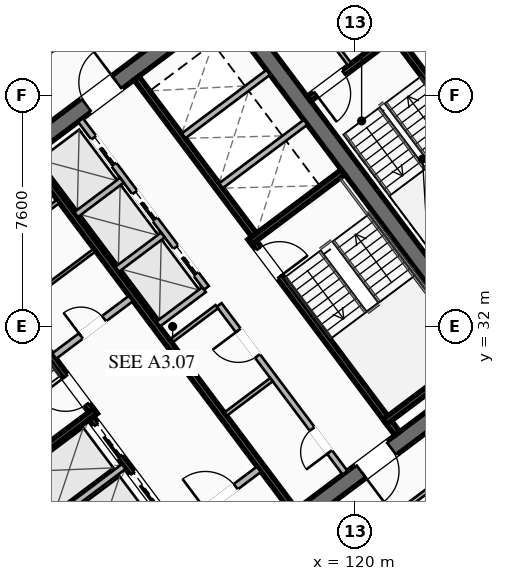
"""IFC4 building model, lengths in metres.
Left out: names, types, materials, properties, quantities, classifications, styles, units other than length and angle.
Written with IfcOpenShell. Run it as: python <this file> out.ifc"""

import sys

from ifc_helpers import new_model, si_unit, direction, frame, frame_2d, origin, place, context, subcontext, project, spatial, rectangle, extrude, element, fill, save


model = new_model("IFC4")
c1 = context("Model", 3, precision=1e-05, world=origin(), true_north=direction((0.0, 1.0)))
c2 = subcontext(c1, "Body", "Model", "MODEL_VIEW")
j1 = project(units=[si_unit("LENGTHUNIT", "METRE"), si_unit("PLANEANGLEUNIT", "RADIAN")], contexts=[c1])
p1 = place(None, origin())
s1 = spatial("IfcSite", under=j1, at=p1, CompositionType="ELEMENT")
p2 = place(p1, origin())
s2 = spatial("IfcBuilding", under=s1, at=p2, CompositionType="ELEMENT")
p3 = place(p2, frame((0.0, 0.0, 142.8)))
s3 = spatial("IfcBuildingStorey", under=s2, at=p3, CompositionType="ELEMENT", Elevation=142.8)
for number, where, z_axis, x_axis in (
    (1, (112.436, 21.077, 0.0), (0.0, 0.0, 1.0), (-0.6, 0.8, 0.0)),
    (2, (115.564, 42.923, 0.0), (0.0, 0.0, 1.0), (0.6, -0.8, 0.0)),
):
    element("IfcWall", number, at=place(p3, frame(where, z_axis=z_axis, x_axis=x_axis)), inside=s3, PredefinedType="SHEAR", context=c2, shape_type="SweptSolid", body=[
        extrude(rectangle(XDim=15.6, YDim=0.55, at=frame_2d((7.8, 0.0))), origin(), (0.0, 0.0, 1.0), 3.55),
    ])
p4 = place(p3, frame((124.539, 30.498, 0.0), z_axis=(0.0, 0.0, 1.0), x_axis=(-0.799998054672, -0.600002593761, 0.0)))
e3 = element("IfcWall", 3, at=p4, inside=s3, PredefinedType="SHEAR", context=c2, shape_type="SweptSolid", body=[
    extrude(rectangle(XDim=15.06, YDim=0.55, at=frame_2d((7.53, 0.0))), origin(), (0.0, 0.0, 1.0), 3.55),
])
p5 = place(p4, frame((9.23, 0.0, 0.0)))
e4 = element("IfcOpeningElement", 4, at=p5, cuts=e3, PredefinedType="OPENING", context=c2, shape_type="SweptSolid", body=[
    extrude(rectangle(XDim=1.25, YDim=2.25, at=frame_2d((0.625, 1.125))), frame((0.0, 0.285, 0.0), z_axis=(0.0, -1.0, 0.0), x_axis=(1.0, 0.0, 0.0)), (0.0, 0.0, 1.0), 0.57),
])
p6 = place(p4, frame((4.18, 0.0, 0.0)))
e5 = element("IfcOpeningElement", 5, at=p6, cuts=e3, PredefinedType="OPENING", context=c2, shape_type="SweptSolid", body=[
    extrude(rectangle(XDim=1.25, YDim=2.25, at=frame_2d((0.625, 1.125))), frame((0.0, 0.285, 0.0), z_axis=(0.0, -1.0, 0.0), x_axis=(1.0, 0.0, 0.0)), (0.0, 0.0, 1.0), 0.57),
])
p7 = place(p3, frame((103.461, 33.502, 0.0), z_axis=(0.0, 0.0, 1.0), x_axis=(0.799998054672, 0.600002593761, 0.0)))
e6 = element("IfcWall", 6, at=p7, inside=s3, PredefinedType="SHEAR", context=c2, shape_type="SweptSolid", body=[
    extrude(rectangle(XDim=15.06, YDim=0.55, at=frame_2d((7.53, 0.0))), origin(), (0.0, 0.0, 1.0), 3.55),
])
p8 = place(p7, frame((4.58, 0.0, 0.0)))
e7 = element("IfcOpeningElement", 7, at=p8, cuts=e6, PredefinedType="OPENING", context=c2, shape_type="SweptSolid", body=[
    extrude(rectangle(XDim=1.25, YDim=2.25, at=frame_2d((0.625, 1.125))), frame((0.0, 0.285, 0.0), z_axis=(0.0, -1.0, 0.0), x_axis=(1.0, 0.0, 0.0)), (0.0, 0.0, 1.0), 0.57),
])
p9 = place(p7, frame((9.63, 0.0, 0.0)))
e8 = element("IfcOpeningElement", 8, at=p9, cuts=e6, PredefinedType="OPENING", context=c2, shape_type="SweptSolid", body=[
    extrude(rectangle(XDim=1.25, YDim=2.25, at=frame_2d((0.625, 1.125))), frame((0.0, 0.285, 0.0), z_axis=(0.0, -1.0, 0.0), x_axis=(1.0, 0.0, 0.0)), (0.0, 0.0, 1.0), 0.57),
])
p10 = place(p3, frame((111.44, 29.08, 0.0), z_axis=(0.0, 0.0, 1.0), x_axis=(-0.59999029481, 0.8000072788, 0.0)))
e9 = element("IfcWall", 9, at=p10, inside=s3, PredefinedType="SHEAR", context=c2, shape_type="SweptSolid", body=[
    extrude(rectangle(XDim=8.05, YDim=0.2, at=frame_2d((4.025, 0.0))), origin(), (0.0, 0.0, 1.0), 3.37),
])
p11 = place(p10, frame((0.45, 0.0, 0.0)))
e10 = element("IfcOpeningElement", 10, at=p11, cuts=e9, PredefinedType="OPENING", context=c2, shape_type="SweptSolid", body=[
    extrude(rectangle(XDim=1.15, YDim=2.2, at=frame_2d((0.575, 1.1))), frame((0.0, 0.11, 0.0), z_axis=(0.0, -1.0, 0.0), x_axis=(1.0, 0.0, 0.0)), (0.0, 0.0, 1.0), 0.22),
])
p12 = place(p3, frame((108.396, 26.922, 0.0), z_axis=(0.0, 0.0, 1.0), x_axis=(0.800015298837, 0.599979601008, 0.0)))
e11 = element("IfcWall", 11, at=p12, inside=s3, PredefinedType="SHEAR", context=c2, shape_type="SweptSolid", body=[
    extrude(rectangle(XDim=3.83, YDim=0.2, at=frame_2d((1.915, 0.0))), origin(), (0.0, 0.0, 1.0), 3.37),
])
p13 = place(p3, frame((116.56, 34.92, 0.0), z_axis=(0.0, 0.0, 1.0), x_axis=(0.59999029481, -0.8000072788, 0.0)))
e12 = element("IfcWall", 12, at=p13, inside=s3, PredefinedType="SHEAR", context=c2, shape_type="SweptSolid", body=[
    extrude(rectangle(XDim=8.05, YDim=0.2, at=frame_2d((4.025, 0.0))), origin(), (0.0, 0.0, 1.0), 3.37),
])
p14 = place(p13, frame((0.45, 0.0, 0.0)))
e13 = element("IfcOpeningElement", 13, at=p14, cuts=e12, PredefinedType="OPENING", context=c2, shape_type="SweptSolid", body=[
    extrude(rectangle(XDim=1.15, YDim=2.2, at=frame_2d((0.575, 1.1))), frame((0.0, 0.11, 0.0), z_axis=(0.0, -1.0, 0.0), x_axis=(1.0, 0.0, 0.0)), (0.0, 0.0, 1.0), 0.22),
])
for number, where, z_axis, x_axis in (
    (14, (116.54, 34.78, 0.0), (0.0, 0.0, 1.0), (0.8, 0.6, 0.0)),
    (15, (120.98, 28.86, 0.0), (0.0, 0.0, 1.0), (0.8, 0.6, 0.0)),
):
    element("IfcWall", number, at=place(p3, frame(where, z_axis=z_axis, x_axis=x_axis)), inside=s3, PredefinedType="SHEAR", context=c2, shape_type="SweptSolid", body=[
        extrude(rectangle(XDim=3.83, YDim=0.2, at=frame_2d((1.915, 0.0))), origin(), (0.0, 0.0, 1.0), 3.37),
    ])
p15 = place(p3, frame((117.998, 25.936, 0.0), z_axis=(0.0, 0.0, 1.0), x_axis=(-0.600002693989, 0.799997979501, 0.0)))
e16 = element("IfcWall", 16, at=p15, inside=s3, PredefinedType="SHEAR", context=c2, shape_type="SweptSolid", body=[
    extrude(rectangle(XDim=14.5, YDim=0.2, at=frame_2d((7.25, 0.0))), origin(), (0.0, 0.0, 1.0), 3.37),
])
p16 = place(p3, frame((110.104, 31.028, 0.0), z_axis=(0.0, 0.0, 1.0), x_axis=(0.800018601094, 0.59997519774, 0.0)))
e17 = element("IfcWall", 17, at=p16, inside=s3, PredefinedType="SOLIDWALL", context=c2, shape_type="SweptSolid", body=[
    extrude(rectangle(XDim=3.15, YDim=0.22, at=frame_2d((1.575, 0.0))), origin(), (0.0, 0.0, 1.0), 2.723),
])
p17 = place(p16, frame((1.1, 0.0, 0.0)))
e18 = element("IfcOpeningElement", 18, at=p17, cuts=e17, PredefinedType="OPENING", context=c2, shape_type="SweptSolid", body=[
    extrude(rectangle(XDim=0.95, YDim=2.05, at=frame_2d((0.475, 1.025))), frame((0.0, 0.12, 0.0), z_axis=(0.0, -1.0, 0.0), x_axis=(1.0, 0.0, 0.0)), (0.0, 0.0, 1.0), 0.24),
])
p18 = place(p3, frame((114.316, 25.412, 0.0), z_axis=(0.0, 0.0, 1.0), x_axis=(0.800018601094, 0.59997519774, 0.0)))
e19 = element("IfcWall", 19, at=p18, inside=s3, PredefinedType="SOLIDWALL", context=c2, shape_type="SweptSolid", body=[
    extrude(rectangle(XDim=3.15, YDim=0.22, at=frame_2d((1.575, 0.0))), origin(), (0.0, 0.0, 1.0), 2.723),
])
p19 = place(p18, frame((0.95, 0.0, 0.0)))
e20 = element("IfcOpeningElement", 20, at=p19, cuts=e19, PredefinedType="OPENING", context=c2, shape_type="SweptSolid", body=[
    extrude(rectangle(XDim=1.25, YDim=2.25, at=frame_2d((0.625, 1.125))), frame((0.0, 0.12, 0.0), z_axis=(0.0, -1.0, 0.0), x_axis=(1.0, 0.0, 0.0)), (0.0, 0.0, 1.0), 0.24),
])
p20 = place(p3, frame((115.19, 23.83, 0.0), z_axis=(0.0, 0.0, 1.0), x_axis=(-0.599993943644, 0.800004542231, 0.0)))
e21 = element("IfcWall", 21, at=p20, inside=s3, PredefinedType="SHEAR", context=c2, shape_type="SweptSolid", body=[
    extrude(rectangle(XDim=6.45, YDim=0.2, at=frame_2d((3.225, 0.0))), origin(), (0.0, 0.0, 1.0), 3.37),
])
p21 = place(p20, frame((4.875, 0.0, 0.0)))
e22 = element("IfcOpeningElement", 22, at=p21, cuts=e21, PredefinedType="OPENING", context=c2, shape_type="SweptSolid", body=[
    extrude(rectangle(XDim=1.3, YDim=2.25, at=frame_2d((0.65, 1.125))), frame((0.0, 0.11, 0.0), z_axis=(0.0, -1.0, 0.0), x_axis=(1.0, 0.0, 0.0)), (0.0, 0.0, 1.0), 0.22),
])
p22 = place(p20, frame((2.875, 0.0, 0.0)))
e23 = element("IfcOpeningElement", 23, at=p22, cuts=e21, PredefinedType="OPENING", context=c2, shape_type="SweptSolid", body=[
    extrude(rectangle(XDim=1.3, YDim=2.25, at=frame_2d((0.65, 1.125))), frame((0.0, 0.11, 0.0), z_axis=(0.0, -1.0, 0.0), x_axis=(1.0, 0.0, 0.0)), (0.0, 0.0, 1.0), 0.22),
])
p23 = place(p20, frame((0.675, 0.0, 0.0)))
e24 = element("IfcOpeningElement", 24, at=p23, cuts=e21, PredefinedType="OPENING", context=c2, shape_type="SweptSolid", body=[
    extrude(rectangle(XDim=1.3, YDim=2.25, at=frame_2d((0.65, 1.125))), frame((0.0, 0.11, 0.0), z_axis=(0.0, -1.0, 0.0), x_axis=(1.0, 0.0, 0.0)), (0.0, 0.0, 1.0), 0.22),
])
p24 = place(p3, frame((109.608, 25.306, 0.0), z_axis=(0.0, 0.0, 1.0), x_axis=(0.8, 0.6, 0.0)))
e25 = element("IfcWall", 25, at=p24, inside=s3, PredefinedType="SOLIDWALL", context=c2, shape_type="SweptSolid", body=[
    extrude(rectangle(XDim=3.48, YDim=0.2, at=frame_2d((1.74, 0.0))), origin(), (0.0, 0.0, 1.0), 3.37),
])
p25 = place(p3, frame((112.81, 40.17, 0.0), z_axis=(0.0, 0.0, 1.0), x_axis=(0.599993943644, -0.800004542231, 0.0)))
e26 = element("IfcWall", 26, at=p25, inside=s3, PredefinedType="SHEAR", context=c2, shape_type="SweptSolid", body=[
    extrude(rectangle(XDim=6.45, YDim=0.2, at=frame_2d((3.225, 0.0))), origin(), (0.0, 0.0, 1.0), 3.37),
])
for number, where, z_axis, x_axis in (
    (27, (115.59, 36.63, 0.0), (0.0, 0.0, 1.0), (0.8, 0.6, 0.0)),
    (28, (114.36, 38.27, 0.0), (0.0, 0.0, 1.0), (0.8, 0.6, 0.0)),
):
    element("IfcWall", number, at=place(p3, frame(where, z_axis=z_axis, x_axis=x_axis)), inside=s3, PredefinedType="SOLIDWALL", context=c2, shape_type="SweptSolid", body=[
        extrude(rectangle(XDim=3.48, YDim=0.2, at=frame_2d((1.74, 0.0))), origin(), (0.0, 0.0, 1.0), 3.37),
    ])
p26 = place(p3, frame((107.71, 34.22, 0.0), z_axis=(0.0, 0.0, 1.0), x_axis=(0.799981399002, 0.60002480053, 0.0)))
e29 = element("IfcWall", 29, at=p26, inside=s3, PredefinedType="PARTITIONING", context=c2, shape_type="SweptSolid", body=[
    extrude(rectangle(XDim=3.15, YDim=0.135, at=frame_2d((1.575, 0.0))), origin(), (0.0, 0.0, 1.0), 2.723),
])
p27 = place(p26, frame((1.05, 0.0, 0.0)))
e30 = element("IfcOpeningElement", 30, at=p27, cuts=e29, PredefinedType="OPENING", context=c2, shape_type="SweptSolid", body=[
    extrude(rectangle(XDim=1.05, YDim=2.2, at=frame_2d((0.525, 1.1))), frame((0.0, 0.077, 0.0), z_axis=(0.0, -1.0, 0.0), x_axis=(1.0, 0.0, 0.0)), (0.0, 0.0, 1.0), 0.155),
])
p28 = place(p3, frame((108.91, 32.62, 0.0), z_axis=(0.0, 0.0, 1.0), x_axis=(0.800018601094, 0.59997519774, 0.0)))
e31 = element("IfcWall", 31, at=p28, inside=s3, PredefinedType="PARTITIONING", context=c2, shape_type="SweptSolid", body=[
    extrude(rectangle(XDim=3.15, YDim=0.11, at=frame_2d((1.575, 0.0))), origin(), (0.0, 0.0, 1.0), 2.723),
])
p29 = place(p3, frame((119.67, 27.19, 0.0), z_axis=(0.0, 0.0, 1.0), x_axis=(-0.599988677396, 0.800008491828, 0.0)))
e32 = element("IfcWall", 32, at=p29, inside=s3, PredefinedType="SOLIDWALL", context=c2, shape_type="SweptSolid", body=[
    extrude(rectangle(XDim=6.9, YDim=0.2, at=frame_2d((3.45, 0.0))), origin(), (0.0, 0.0, 1.0), 2.723),
])
p30 = place(p29, frame((0.85, 0.0, 0.0)))
e33 = element("IfcOpeningElement", 33, at=p30, cuts=e32, PredefinedType="OPENING", context=c2, shape_type="SweptSolid", body=[
    extrude(rectangle(XDim=0.95, YDim=2.05, at=frame_2d((0.475, 1.025))), frame((0.0, 0.11, 0.0), z_axis=(0.0, -1.0, 0.0), x_axis=(1.0, 0.0, 0.0)), (0.0, 0.0, 1.0), 0.22),
])
p31 = place(p29, frame((4.8, 0.0, 0.0)))
e34 = element("IfcOpeningElement", 34, at=p31, cuts=e32, PredefinedType="OPENING", context=c2, shape_type="SweptSolid", body=[
    extrude(rectangle(XDim=1.05, YDim=2.2, at=frame_2d((0.525, 1.1))), frame((0.0, 0.11, 0.0), z_axis=(0.0, -1.0, 0.0), x_axis=(1.0, 0.0, 0.0)), (0.0, 0.0, 1.0), 0.22),
])
for number, where, z_axis, x_axis in (
    (35, (113.946, 31.522, 0.0), (0.0, 0.0, 1.0), (0.8, 0.6, 0.0)),
    (36, (115.746, 29.122, 0.0), (0.0, 0.0, 1.0), (0.8, 0.6, 0.0)),
):
    element("IfcWall", number, at=place(p3, frame(where, z_axis=z_axis, x_axis=x_axis)), inside=s3, PredefinedType="PARTITIONING", context=c2, shape_type="SweptSolid", body=[
        extrude(rectangle(XDim=1.88, YDim=0.135, at=frame_2d((0.94, 0.0))), origin(), (0.0, 0.0, 1.0), 2.723),
    ])
p32 = place(p3, frame((115.11, 33.27, 0.0), z_axis=(0.0, 0.0, 1.0), x_axis=(-0.600011322243, 0.799991508192, 0.0)))
e37 = element("IfcWall", 37, at=p32, inside=s3, PredefinedType="SOLIDWALL", context=c2, shape_type="SweptSolid", body=[
    extrude(rectangle(XDim=6.9, YDim=0.2, at=frame_2d((3.45, 0.0))), origin(), (0.0, 0.0, 1.0), 3.37),
])
p33 = place(p32, frame((0.575, 0.0, 0.0)))
e38 = element("IfcOpeningElement", 38, at=p33, cuts=e37, PredefinedType="OPENING", context=c2, shape_type="SweptSolid", body=[
    extrude(rectangle(XDim=1.1, YDim=2.2, at=frame_2d((0.55, 1.1))), frame((0.0, 0.11, 0.0), z_axis=(0.0, -1.0, 0.0), x_axis=(1.0, 0.0, 0.0)), (0.0, 0.0, 1.0), 0.22),
])
p34 = place(p32, frame((2.825, 0.0, 0.0)))
e39 = element("IfcOpeningElement", 39, at=p34, cuts=e37, PredefinedType="OPENING", context=c2, shape_type="SweptSolid", body=[
    extrude(rectangle(XDim=1.1, YDim=2.2, at=frame_2d((0.55, 1.1))), frame((0.0, 0.11, 0.0), z_axis=(0.0, -1.0, 0.0), x_axis=(1.0, 0.0, 0.0)), (0.0, 0.0, 1.0), 0.22),
])
p35 = place(p32, frame((5.075, 0.0, 0.0)))
e40 = element("IfcOpeningElement", 40, at=p35, cuts=e37, PredefinedType="OPENING", context=c2, shape_type="SweptSolid", body=[
    extrude(rectangle(XDim=1.1, YDim=2.2, at=frame_2d((0.55, 1.1))), frame((0.0, 0.11, 0.0), z_axis=(0.0, -1.0, 0.0), x_axis=(1.0, 0.0, 0.0)), (0.0, 0.0, 1.0), 0.22),
])
p36 = place(p3, frame((113.526, 32.082, 0.0), z_axis=(0.0, 0.0, 1.0), x_axis=(0.800046745961, 0.599937666993, 0.0)))
e41 = element("IfcWall", 41, at=p36, inside=s3, PredefinedType="SOLIDWALL", context=c2, shape_type="SweptSolid", body=[
    extrude(rectangle(XDim=1.88, YDim=0.2, at=frame_2d((0.94, 0.0))), origin(), (0.0, 0.0, 1.0), 3.37),
])
p37 = place(p3, frame((112.176, 33.882, 0.0), z_axis=(0.0, 0.0, 1.0), x_axis=(0.8, 0.6, 0.0)))
e42 = element("IfcWall", 42, at=p37, inside=s3, PredefinedType="SOLIDWALL", context=c2, shape_type="SweptSolid", body=[
    extrude(rectangle(XDim=1.88, YDim=0.2, at=frame_2d((0.94, 0.0))), origin(), (0.0, 0.0, 1.0), 3.37),
])
p38 = place(p3, frame((110.826, 35.682, 0.0), z_axis=(0.0, 0.0, 1.0), x_axis=(0.799984418148, 0.600020775241, 0.0)))
e43 = element("IfcWall", 43, at=p38, inside=s3, PredefinedType="SOLIDWALL", context=c2, shape_type="SweptSolid", body=[
    extrude(rectangle(XDim=1.88, YDim=0.2, at=frame_2d((0.94, 0.0))), origin(), (0.0, 0.0, 1.0), 3.37),
])
p39 = place(p3, frame((125.304, 36.228, 0.0), z_axis=(0.0, 0.0, 1.0), x_axis=(-0.59998851072, 0.800008616831, 0.0)))
e44 = element("IfcWall", 44, at=p39, inside=s3, PredefinedType="SHEAR", context=c2, shape_type="SweptSolid", body=[
    extrude(rectangle(XDim=6.8, YDim=0.2, at=frame_2d((3.4, 0.0))), origin(), (0.0, 0.0, 1.0), 3.37),
])
p40 = place(p3, frame((121.204, 41.528, 0.0), z_axis=(0.0, 0.0, 1.0), x_axis=(-0.800017232136, -0.599977023131, 0.0)))
e45 = element("IfcWall", 45, at=p40, inside=s3, PredefinedType="SHEAR", context=c2, shape_type="SweptSolid", body=[
    extrude(rectangle(XDim=3.4, YDim=0.2, at=frame_2d((1.7, 0.0))), origin(), (0.0, 0.0, 1.0), 3.37),
])
p41 = place(p40, frame((1.975, 0.0, 0.0)))
e46 = element("IfcOpeningElement", 46, at=p41, cuts=e45, PredefinedType="OPENING", context=c2, shape_type="SweptSolid", body=[
    extrude(rectangle(XDim=1.15, YDim=2.2, at=frame_2d((0.575, 1.1))), frame((0.0, 0.11, 0.0), z_axis=(0.0, -1.0, 0.0), x_axis=(1.0, 0.0, 0.0)), (0.0, 0.0, 1.0), 0.22),
])
p42 = place(p3, frame((119.824, 40.618, 0.0), z_axis=(0.0, 0.0, 1.0), x_axis=(-0.599982243973, 0.800013316712, 0.0)))
e47 = element("IfcWall", 47, at=p42, inside=s3, PredefinedType="PARTITIONING", context=c2, shape_type="SweptSolid", body=[
    extrude(rectangle(XDim=4.4, YDim=0.135, at=frame_2d((2.2, 0.0))), origin(), (0.0, 0.0, 1.0), 2.723),
])
p43 = place(p3, frame((95.678, 30.346, 0.0), z_axis=(0.0, 0.0, 1.0), x_axis=(0.8, 0.6, 0.0)))
e48 = element("IfcWall", 48, at=p43, inside=s3, PredefinedType="PARTITIONING", context=c2, shape_type="SweptSolid", body=[
    extrude(rectangle(XDim=31.3, YDim=0.135, at=frame_2d((15.65, 0.0))), origin(), (0.0, 0.0, 1.0), 2.723),
])
p44 = place(p43, frame((0.3, 0.0, 0.0)))
e49 = element("IfcOpeningElement", 49, at=p44, cuts=e48, PredefinedType="OPENING", context=c2, shape_type="SweptSolid", body=[
    extrude(rectangle(XDim=0.95, YDim=2.05, at=frame_2d((0.475, 1.025))), frame((0.0, 0.077, 0.0), z_axis=(0.0, -1.0, 0.0), x_axis=(1.0, 0.0, 0.0)), (0.0, 0.0, 1.0), 0.155),
])
p45 = place(p43, frame((30.05, 0.0, 0.0)))
e50 = element("IfcOpeningElement", 50, at=p45, cuts=e48, PredefinedType="OPENING", context=c2, shape_type="SweptSolid", body=[
    extrude(rectangle(XDim=0.95, YDim=2.05, at=frame_2d((0.475, 1.025))), frame((0.0, 0.077, 0.0), z_axis=(0.0, -1.0, 0.0), x_axis=(1.0, 0.0, 0.0)), (0.0, 0.0, 1.0), 0.155),
])
p46 = place(p3, frame((132.13, 33.91, 0.0), z_axis=(0.0, 0.0, 1.0), x_axis=(-0.799997191971, -0.600003744021, 0.0)))
e51 = element("IfcWall", 51, at=p46, inside=s3, PredefinedType="PARTITIONING", context=c2, shape_type="SweptSolid", body=[
    extrude(rectangle(XDim=31.3, YDim=0.135, at=frame_2d((15.65, 0.0))), origin(), (0.0, 0.0, 1.0), 2.723),
])
p47 = place(p46, frame((29.97, 0.0, 0.0)))
e52 = element("IfcOpeningElement", 52, at=p47, cuts=e51, PredefinedType="OPENING", context=c2, shape_type="SweptSolid", body=[
    extrude(rectangle(XDim=0.95, YDim=2.05, at=frame_2d((0.475, 1.025))), frame((0.0, 0.077, 0.0), z_axis=(0.0, -1.0, 0.0), x_axis=(1.0, 0.0, 0.0)), (0.0, 0.0, 1.0), 0.155),
])
p48 = place(p46, frame((0.38, 0.0, 0.0)))
e53 = element("IfcOpeningElement", 53, at=p48, cuts=e51, PredefinedType="OPENING", context=c2, shape_type="SweptSolid", body=[
    extrude(rectangle(XDim=0.95, YDim=2.05, at=frame_2d((0.475, 1.025))), frame((0.0, 0.077, 0.0), z_axis=(0.0, -1.0, 0.0), x_axis=(1.0, 0.0, 0.0)), (0.0, 0.0, 1.0), 0.155),
])
p49 = place(p3, frame((112.104, 20.928, 0.0), z_axis=(0.0, 0.0, 1.0), x_axis=(-0.599994940075, 0.800003794918, 0.0)))
e54 = element("IfcWall", 54, at=p49, inside=s3, PredefinedType="PARTITIONING", context=c2, shape_type="SweptSolid", body=[
    extrude(rectangle(XDim=15.44, YDim=0.135, at=frame_2d((7.72, 0.0))), origin(), (0.0, 0.0, 1.0), 2.723),
])
p50 = place(p9, origin())
e55 = element("IfcDoor", 55, at=p50, inside=s3, OperationType="SINGLE_SWING_RIGHT", PredefinedType="DOOR", context=c2, shape_type="SweptSolid", body=[
    extrude(rectangle(XDim=1.25, YDim=2.25, at=frame_2d((0.625, 1.125))), frame((0.0, 0.025, 0.0), z_axis=(0.0, -1.0, 0.0), x_axis=(1.0, 0.0, 0.0)), (0.0, 0.0, 1.0), 0.05),
])
fill(e8, e55)
p51 = place(p6, origin())
e56 = element("IfcDoor", 56, at=p51, inside=s3, OperationType="SINGLE_SWING_RIGHT", PredefinedType="DOOR", context=c2, shape_type="SweptSolid", body=[
    extrude(rectangle(XDim=1.25, YDim=2.25, at=frame_2d((0.625, 1.125))), frame((0.0, 0.025, 0.0), z_axis=(0.0, -1.0, 0.0), x_axis=(1.0, 0.0, 0.0)), (0.0, 0.0, 1.0), 0.05),
])
fill(e5, e56)
p52 = place(p11, origin())
e57 = element("IfcDoor", 57, at=p52, inside=s3, OperationType="SINGLE_SWING_RIGHT", PredefinedType="DOOR", context=c2, shape_type="SweptSolid", body=[
    extrude(rectangle(XDim=1.15, YDim=2.2, at=frame_2d((0.575, 1.1))), frame((0.0, 0.025, 0.0), z_axis=(0.0, -1.0, 0.0), x_axis=(1.0, 0.0, 0.0)), (0.0, 0.0, 1.0), 0.05),
])
fill(e10, e57)
p53 = place(p14, origin())
e58 = element("IfcDoor", 58, at=p53, inside=s3, OperationType="SINGLE_SWING_RIGHT", PredefinedType="DOOR", context=c2, shape_type="SweptSolid", body=[
    extrude(rectangle(XDim=1.15, YDim=2.2, at=frame_2d((0.575, 1.1))), frame((0.0, 0.025, 0.0), z_axis=(0.0, -1.0, 0.0), x_axis=(1.0, 0.0, 0.0)), (0.0, 0.0, 1.0), 0.05),
])
fill(e13, e58)
p54 = place(p19, origin())
e59 = element("IfcDoor", 59, at=p54, inside=s3, OperationType="SINGLE_SWING_LEFT", PredefinedType="DOOR", context=c2, shape_type="SweptSolid", body=[
    extrude(rectangle(XDim=1.25, YDim=2.25, at=frame_2d((0.625, 1.125))), frame((0.0, 0.025, 0.0), z_axis=(0.0, -1.0, 0.0), x_axis=(1.0, 0.0, 0.0)), (0.0, 0.0, 1.0), 0.05),
])
fill(e20, e59)
p55 = place(p17, origin())
e60 = element("IfcDoor", 60, at=p55, inside=s3, OperationType="SINGLE_SWING_LEFT", PredefinedType="DOOR", context=c2, shape_type="SweptSolid", body=[
    extrude(rectangle(XDim=0.95, YDim=2.05, at=frame_2d((0.475, 1.025))), frame((0.0, 0.025, 0.0), z_axis=(0.0, -1.0, 0.0), x_axis=(1.0, 0.0, 0.0)), (0.0, 0.0, 1.0), 0.05),
])
fill(e18, e60)
p56 = place(p30, origin())
e61 = element("IfcDoor", 61, at=p56, inside=s3, OperationType="SINGLE_SWING_LEFT", PredefinedType="DOOR", context=c2, shape_type="SweptSolid", body=[
    extrude(rectangle(XDim=0.95, YDim=2.05, at=frame_2d((0.475, 1.025))), frame((0.0, 0.025, 0.0), z_axis=(0.0, -1.0, 0.0), x_axis=(1.0, 0.0, 0.0)), (0.0, 0.0, 1.0), 0.05),
])
fill(e33, e61)
p57 = place(p31, origin())
e62 = element("IfcDoor", 62, at=p57, inside=s3, OperationType="SINGLE_SWING_RIGHT", PredefinedType="DOOR", context=c2, shape_type="SweptSolid", body=[
    extrude(rectangle(XDim=1.05, YDim=2.2, at=frame_2d((0.525, 1.1))), frame((0.0, 0.025, 0.0), z_axis=(0.0, -1.0, 0.0), x_axis=(1.0, 0.0, 0.0)), (0.0, 0.0, 1.0), 0.05),
])
fill(e34, e62)
p58 = place(p41, origin())
e63 = element("IfcDoor", 63, at=p58, inside=s3, OperationType="SINGLE_SWING_RIGHT", PredefinedType="DOOR", context=c2, shape_type="SweptSolid", body=[
    extrude(rectangle(XDim=1.15, YDim=2.2, at=frame_2d((0.575, 1.1))), frame((0.0, 0.025, 0.0), z_axis=(0.0, -1.0, 0.0), x_axis=(1.0, 0.0, 0.0)), (0.0, 0.0, 1.0), 0.05),
])
fill(e46, e63)
p59 = place(p21, origin())
e64 = element("IfcDoor", 64, at=p59, inside=s3, OperationType="SLIDING_TO_LEFT", PredefinedType="DOOR", context=c2, shape_type="SweptSolid", body=[
    extrude(rectangle(XDim=1.3, YDim=2.25, at=frame_2d((0.65, 1.125))), frame((0.0, 0.025, 0.0), z_axis=(0.0, -1.0, 0.0), x_axis=(1.0, 0.0, 0.0)), (0.0, 0.0, 1.0), 0.05),
])
fill(e22, e64)
p60 = place(p22, origin())
e65 = element("IfcDoor", 65, at=p60, inside=s3, OperationType="SLIDING_TO_LEFT", PredefinedType="DOOR", context=c2, shape_type="SweptSolid", body=[
    extrude(rectangle(XDim=1.3, YDim=2.25, at=frame_2d((0.65, 1.125))), frame((0.0, 0.025, 0.0), z_axis=(0.0, -1.0, 0.0), x_axis=(1.0, 0.0, 0.0)), (0.0, 0.0, 1.0), 0.05),
])
fill(e23, e65)
p61 = place(p33, origin())
e66 = element("IfcDoor", 66, at=p61, inside=s3, OperationType="SLIDING_TO_LEFT", PredefinedType="DOOR", context=c2, shape_type="SweptSolid", body=[
    extrude(rectangle(XDim=1.1, YDim=2.2, at=frame_2d((0.55, 1.1))), frame((0.0, 0.025, 0.0), z_axis=(0.0, -1.0, 0.0), x_axis=(1.0, 0.0, 0.0)), (0.0, 0.0, 1.0), 0.05),
])
fill(e38, e66)
p62 = place(p34, origin())
e67 = element("IfcDoor", 67, at=p62, inside=s3, OperationType="SLIDING_TO_LEFT", PredefinedType="DOOR", context=c2, shape_type="SweptSolid", body=[
    extrude(rectangle(XDim=1.1, YDim=2.2, at=frame_2d((0.55, 1.1))), frame((0.0, 0.025, 0.0), z_axis=(0.0, -1.0, 0.0), x_axis=(1.0, 0.0, 0.0)), (0.0, 0.0, 1.0), 0.05),
])
fill(e39, e67)
p63 = place(p35, origin())
e68 = element("IfcDoor", 68, at=p63, inside=s3, OperationType="SLIDING_TO_LEFT", PredefinedType="DOOR", context=c2, shape_type="SweptSolid", body=[
    extrude(rectangle(XDim=1.1, YDim=2.2, at=frame_2d((0.55, 1.1))), frame((0.0, 0.025, 0.0), z_axis=(0.0, -1.0, 0.0), x_axis=(1.0, 0.0, 0.0)), (0.0, 0.0, 1.0), 0.05),
])
fill(e40, e68)
save(model, sys.argv[1])
